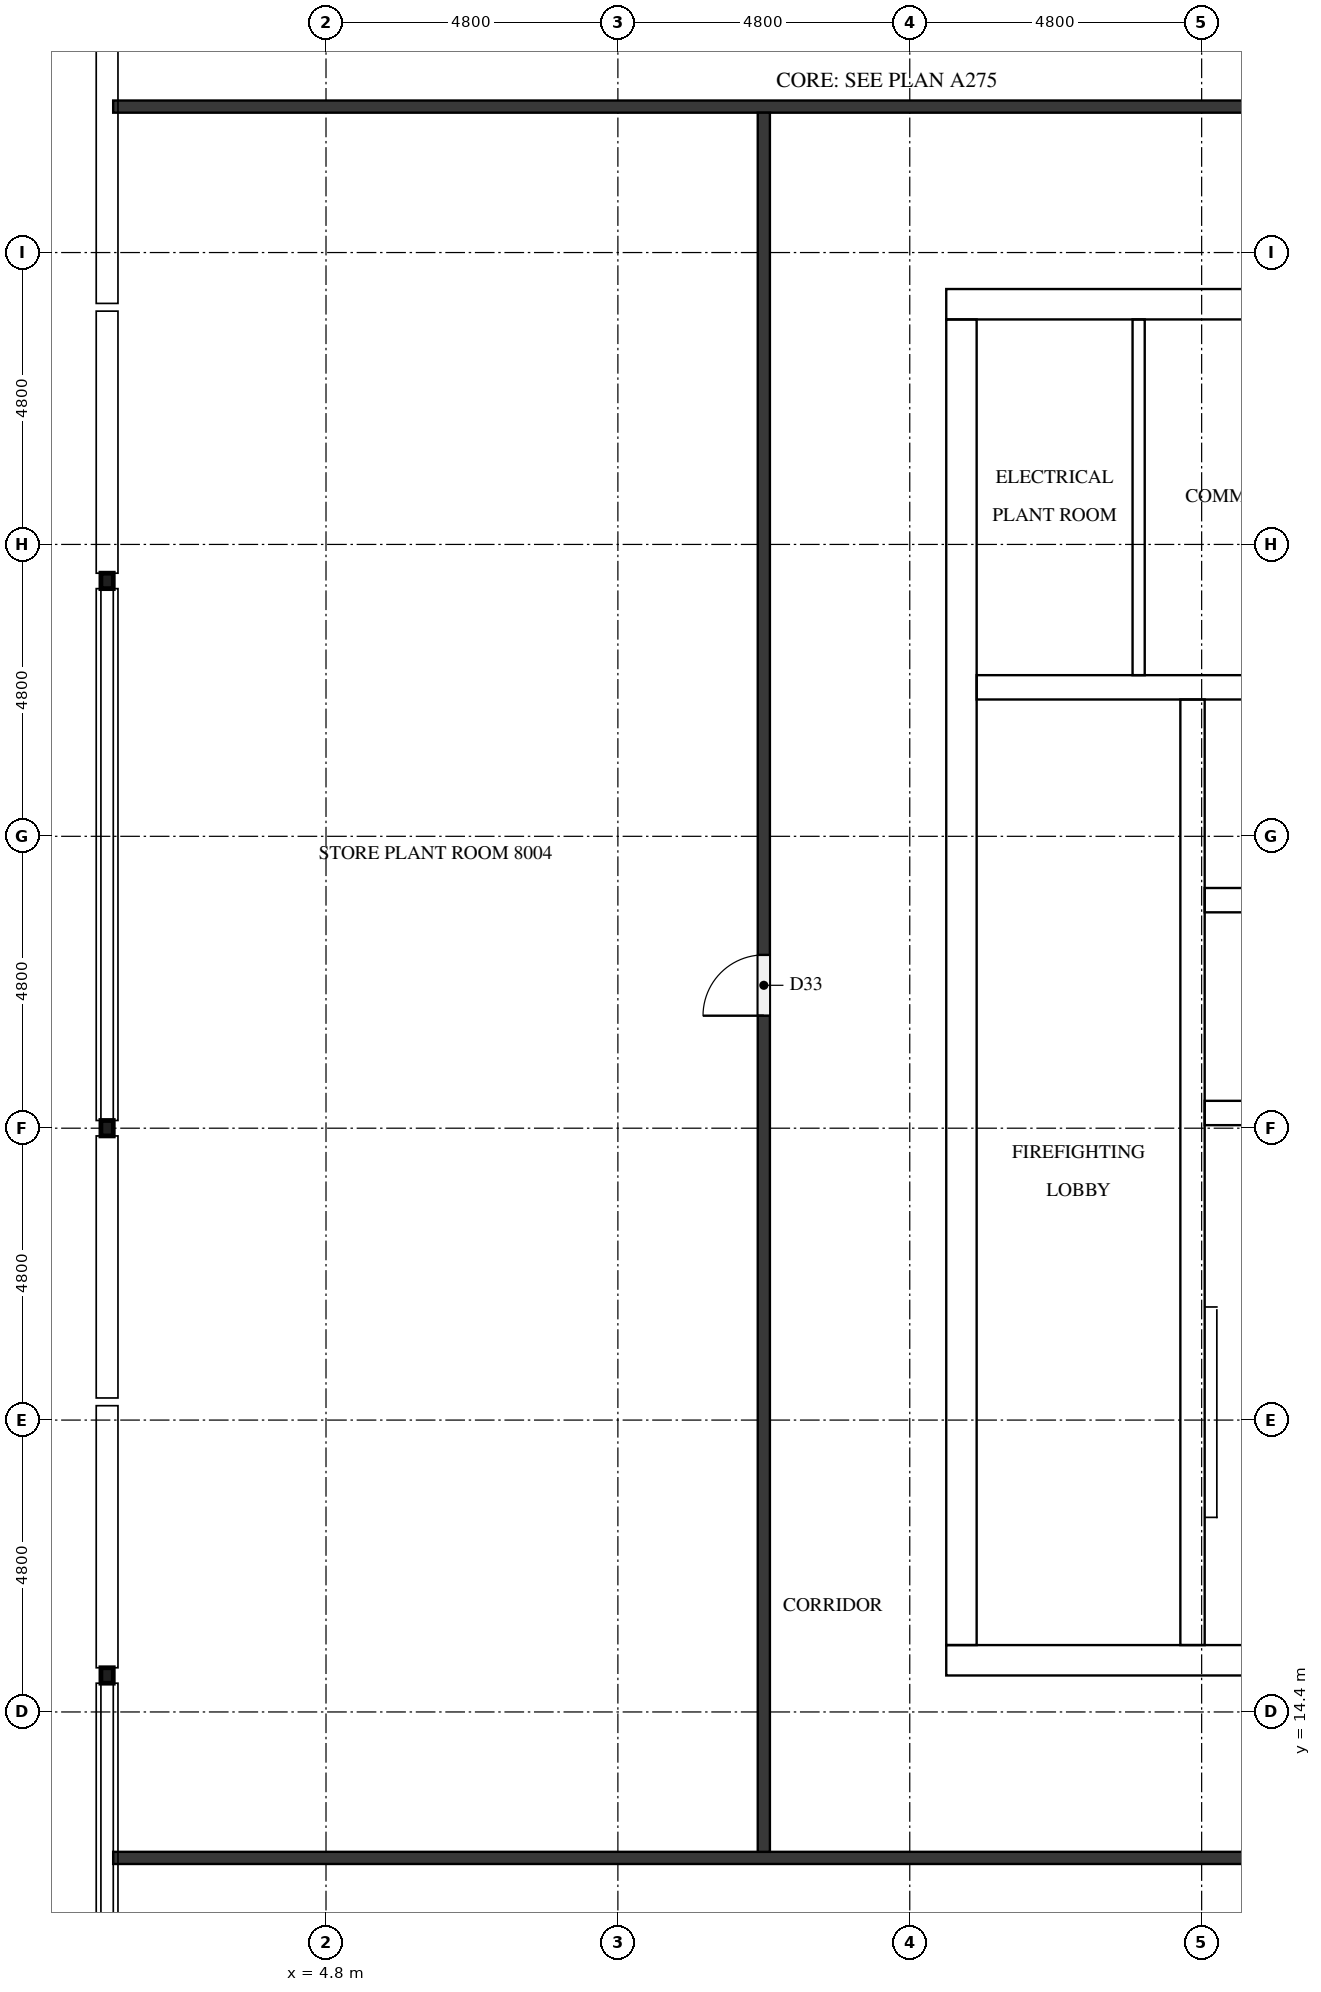
"""IFC4 building model, lengths in metres.
Left out: names, types, materials, properties, quantities, classifications, styles, units other than length and angle.
Written with IfcOpenShell. Run it as: python <this file> out.ifc"""

import sys

from ifc_helpers import new_model, si_unit, direction, frame, frame_2d, origin, origin_2d, place, context, subcontext, project, spatial, rectangle, hollow_rectangle, extrude, element, fill, save


model = new_model("IFC4")
c1 = context("Model", 3, precision=1e-05, world=origin(), true_north=direction((0.0, 1.0)))
c2 = subcontext(c1, "Body", "Model", "MODEL_VIEW")
j1 = project(units=[si_unit("LENGTHUNIT", "METRE"), si_unit("PLANEANGLEUNIT", "RADIAN")], contexts=[c1])
p1 = place(None, origin())
s1 = spatial("IfcSite", under=j1, at=p1, CompositionType="ELEMENT")
p2 = place(p1, origin())
s2 = spatial("IfcBuilding", under=s1, at=p2, CompositionType="ELEMENT")
p3 = place(p2, frame((0.0, 0.0, 310.1)))
s3 = spatial("IfcBuildingStorey", under=s2, at=p3, CompositionType="ELEMENT", Elevation=310.1)
p4 = place(p3, frame((15.0, 15.25, 0.0), z_axis=(0.0, 0.0, 1.0), x_axis=(1.0, 0.0, 0.0)))
e1 = element("IfcWall", 1, at=p4, inside=s3, PredefinedType="SHEAR", context=c2, shape_type="SweptSolid", body=[
    extrude(rectangle(XDim=32.4, YDim=0.5, at=frame_2d((16.2, 0.0))), origin(), (0.0, 0.0, 1.0), 3.8),
])
p5 = place(p4, frame((15.3, 0.0, 0.0)))
e2 = element("IfcOpeningElement", 2, at=p5, cuts=e1, PredefinedType="OPENING", context=c2, shape_type="SweptSolid", body=[
    extrude(rectangle(XDim=1.8, YDim=2.1, at=frame_2d((0.9, 1.05))), frame((0.0, 0.26, 0.0), z_axis=(0.0, -1.0, 0.0), x_axis=(1.0, 0.0, 0.0)), (0.0, 0.0, 1.0), 0.52),
])
p6 = place(p3, frame((15.0, 37.55, 0.0), z_axis=(0.0, 0.0, 1.0), x_axis=(1.0, 0.0, 0.0)))
e3 = element("IfcWall", 3, at=p6, inside=s3, PredefinedType="SHEAR", context=c2, shape_type="SweptSolid", body=[
    extrude(rectangle(XDim=32.4, YDim=0.5, at=frame_2d((16.2, 0.0))), origin(), (0.0, 0.0, 1.0), 3.8),
])
p7 = place(p6, frame((15.3, 0.0, 0.0)))
e4 = element("IfcOpeningElement", 4, at=p7, cuts=e3, PredefinedType="OPENING", context=c2, shape_type="SweptSolid", body=[
    extrude(rectangle(XDim=1.8, YDim=2.1, at=frame_2d((0.9, 1.05))), frame((0.0, 0.26, 0.0), z_axis=(0.0, -1.0, 0.0), x_axis=(1.0, 0.0, 0.0)), (0.0, 0.0, 1.0), 0.52),
])
p8 = place(p6, frame((1.282, 0.0, 0.0)))
e5 = element("IfcOpeningElement", 5, at=p8, cuts=e3, PredefinedType="OPENING", context=c2, shape_type="SweptSolid", body=[
    extrude(rectangle(XDim=1.0, YDim=2.1, at=frame_2d((0.5, 1.05))), frame((0.0, 0.26, 0.0), z_axis=(0.0, -1.0, 0.0), x_axis=(1.0, 0.0, 0.0)), (0.0, 0.0, 1.0), 0.52),
])
p9 = place(p6, frame((5.082, 0.0, 0.0)))
e6 = element("IfcOpeningElement", 6, at=p9, cuts=e3, PredefinedType="OPENING", context=c2, shape_type="SweptSolid", body=[
    extrude(rectangle(XDim=1.0, YDim=2.1, at=frame_2d((0.5, 1.05))), frame((0.0, 0.26, 0.0), z_axis=(0.0, -1.0, 0.0), x_axis=(1.0, 0.0, 0.0)), (0.0, 0.0, 1.0), 0.52),
])
p10 = place(p3, frame((15.25, 15.5, 0.0), z_axis=(0.0, 0.0, 1.0), x_axis=(0.0, 1.0, 0.0)))
e7 = element("IfcWall", 7, at=p10, inside=s3, PredefinedType="SHEAR", context=c2, shape_type="SweptSolid", body=[
    extrude(rectangle(XDim=21.8, YDim=0.5, at=frame_2d((10.9, 0.0))), origin(), (0.0, 0.0, 1.0), 3.8),
])
p11 = place(p10, frame((5.26, 0.0, 0.0)))
e8 = element("IfcOpeningElement", 8, at=p11, cuts=e7, PredefinedType="OPENING", context=c2, shape_type="SweptSolid", body=[
    extrude(rectangle(XDim=1.2, YDim=2.1, at=frame_2d((0.6, 1.05))), frame((0.0, 0.26, 0.0), z_axis=(0.0, -1.0, 0.0), x_axis=(1.0, 0.0, 0.0)), (0.0, 0.0, 1.0), 0.52),
])
p12 = place(p3, frame((19.05, 15.5, 0.0), z_axis=(0.0, 0.0, 1.0), x_axis=(0.0, 1.0, 0.0)))
e9 = element("IfcWall", 9, at=p12, inside=s3, PredefinedType="SHEAR", context=c2, shape_type="SweptSolid", body=[
    extrude(rectangle(XDim=15.55, YDim=0.4, at=frame_2d((7.775, 0.0))), origin(), (0.0, 0.0, 1.0), 3.8),
])
p13 = place(p12, frame((9.95, 0.0, 0.0)))
e10 = element("IfcOpeningElement", 10, at=p13, cuts=e9, PredefinedType="OPENING", context=c2, shape_type="SweptSolid", body=[
    extrude(rectangle(XDim=1.1, YDim=2.1, at=frame_2d((0.55, 1.05))), frame((0.0, 0.21, 0.0), z_axis=(0.0, -1.0, 0.0), x_axis=(1.0, 0.0, 0.0)), (0.0, 0.0, 1.0), 0.42),
])
p14 = place(p12, frame((13.45, 0.0, 0.0)))
e11 = element("IfcOpeningElement", 11, at=p14, cuts=e9, PredefinedType="OPENING", context=c2, shape_type="SweptSolid", body=[
    extrude(rectangle(XDim=1.1, YDim=2.1, at=frame_2d((0.55, 1.05))), frame((0.0, 0.21, 0.0), z_axis=(0.0, -1.0, 0.0), x_axis=(1.0, 0.0, 0.0)), (0.0, 0.0, 1.0), 0.42),
])
p15 = place(p12, frame((0.7, 0.0, 0.0)))
e12 = element("IfcOpeningElement", 12, at=p15, cuts=e9, PredefinedType="OPENING", context=c2, shape_type="SweptSolid", body=[
    extrude(rectangle(XDim=1.2, YDim=2.1, at=frame_2d((0.6, 1.05))), frame((0.0, 0.21, 0.0), z_axis=(0.0, -1.0, 0.0), x_axis=(1.0, 0.0, 0.0)), (0.0, 0.0, 1.0), 0.42),
])
for number, where, z_axis, x_axis in (
    (13, (19.25, 24.25, 0.0), (0.0, 0.0, 1.0), (1.0, 0.0, 0.0)),
    (14, (19.25, 27.75, 0.0), (0.0, 0.0, 1.0), (1.0, 0.0, 0.0)),
):
    element("IfcWall", number, at=place(p3, frame(where, z_axis=z_axis, x_axis=x_axis)), inside=s3, PredefinedType="SHEAR", context=c2, shape_type="SweptSolid", body=[
        extrude(rectangle(XDim=3.65, YDim=0.4, at=frame_2d((1.825, 0.0))), origin(), (0.0, 0.0, 1.0), 3.8),
    ])
p16 = place(p3, frame((15.5, 31.25, 0.0), z_axis=(0.0, 0.0, 1.0), x_axis=(1.0, 0.0, 0.0)))
e15 = element("IfcWall", 15, at=p16, inside=s3, PredefinedType="SHEAR", context=c2, shape_type="SweptSolid", body=[
    extrude(rectangle(XDim=7.4, YDim=0.4, at=frame_2d((3.7, 0.0))), origin(), (0.0, 0.0, 1.0), 3.8),
])
for number, where, z_axis, x_axis in (
    (16, (1.2, 33.0, 0.0), (0.0, 0.0, 1.0), (1.0, 0.0, 0.0)),
    (17, (1.2, 24.0, 0.0), (0.0, 0.0, 1.0), (1.0, 0.0, 0.0)),
    (18, (1.2, 15.0, 0.0), (0.0, 0.0, 1.0), (1.0, 0.0, 0.0)),
):
    element("IfcColumn", number, at=place(p3, frame(where, z_axis=z_axis, x_axis=x_axis)), inside=s3, PredefinedType="COLUMN", context=c2, shape_type="SweptSolid", body=[
        extrude(hollow_rectangle(XDim=0.203, YDim=0.254, WallThickness=0.01, InnerFilletRadius=0.004, OuterFilletRadius=0.013, at=origin_2d()), origin(), (0.0, 0.0, 1.0), 3.8),
    ])
p17 = place(p3, frame((18.164, 31.45, 0.0), z_axis=(0.0, 0.0, 1.0), x_axis=(0.0, 1.0, 0.0)))
e19 = element("IfcWall", 19, at=p17, inside=s3, PredefinedType="PARTITIONING", context=c2, shape_type="SweptSolid", body=[
    extrude(rectangle(XDim=5.85, YDim=0.2, at=frame_2d((2.925, 0.0))), origin(), (0.0, 0.0, 1.0), 3.8),
])
p18 = place(p3, frame((56.3, 12.0, 0.0), z_axis=(0.0, 0.0, 1.0), x_axis=(-1.0, 0.0, 0.0)))
e20 = element("IfcWall", 20, at=p18, inside=s3, PredefinedType="PARTITIONING", context=c2, shape_type="SweptSolid", body=[
    extrude(rectangle(XDim=55.0, YDim=0.2, at=frame_2d((27.5, 0.0))), origin(), (0.0, 0.0, 1.0), 3.8),
])
p19 = place(p18, frame((35.35, 0.0, 0.0)))
e21 = element("IfcOpeningElement", 21, at=p19, cuts=e20, PredefinedType="OPENING", context=c2, shape_type="SweptSolid", body=[
    extrude(rectangle(XDim=1.0, YDim=2.1, at=frame_2d((0.5, 1.05))), frame((0.0, 0.11, 0.0), z_axis=(0.0, -1.0, 0.0), x_axis=(1.0, 0.0, 0.0)), (0.0, 0.0, 1.0), 0.22),
])
p20 = place(p18, frame((16.15, 0.0, 0.0)))
e22 = element("IfcOpeningElement", 22, at=p20, cuts=e20, PredefinedType="OPENING", context=c2, shape_type="SweptSolid", body=[
    extrude(rectangle(XDim=1.0, YDim=2.1, at=frame_2d((0.5, 1.05))), frame((0.0, 0.11, 0.0), z_axis=(0.0, -1.0, 0.0), x_axis=(1.0, 0.0, 0.0)), (0.0, 0.0, 1.0), 0.22),
])
p21 = place(p3, frame((1.3, 40.8, 0.0), z_axis=(0.0, 0.0, 1.0), x_axis=(1.0, 0.0, 0.0)))
e23 = element("IfcWall", 23, at=p21, inside=s3, PredefinedType="PARTITIONING", context=c2, shape_type="SweptSolid", body=[
    extrude(rectangle(XDim=55.0, YDim=0.2, at=frame_2d((27.5, 0.0))), origin(), (0.0, 0.0, 1.0), 3.8),
])
p22 = place(p21, frame((29.35, 0.0, 0.0)))
e24 = element("IfcOpeningElement", 24, at=p22, cuts=e23, PredefinedType="OPENING", context=c2, shape_type="SweptSolid", body=[
    extrude(rectangle(XDim=1.0, YDim=2.1, at=frame_2d((0.5, 1.05))), frame((0.0, 0.11, 0.0), z_axis=(0.0, -1.0, 0.0), x_axis=(1.0, 0.0, 0.0)), (0.0, 0.0, 1.0), 0.22),
])
p23 = place(p3, frame((12.0, 12.1, 0.0), z_axis=(0.0, 0.0, 1.0), x_axis=(0.0, 1.0, 0.0)))
e25 = element("IfcWall", 25, at=p23, inside=s3, PredefinedType="PARTITIONING", context=c2, shape_type="SweptSolid", body=[
    extrude(rectangle(XDim=28.6, YDim=0.2, at=frame_2d((14.3, 0.0))), origin(), (0.0, 0.0, 1.0), 3.8),
])
p24 = place(p23, frame((13.75, 0.0, 0.0)))
e26 = element("IfcOpeningElement", 26, at=p24, cuts=e25, PredefinedType="OPENING", context=c2, shape_type="SweptSolid", body=[
    extrude(rectangle(XDim=1.0, YDim=2.1, at=frame_2d((0.5, 1.05))), frame((0.0, 0.11, 0.0), z_axis=(0.0, -1.0, 0.0), x_axis=(1.0, 0.0, 0.0)), (0.0, 0.0, 1.0), 0.22),
])
p25 = place(p13, origin())
e27 = element("IfcDoor", 27, at=p25, inside=s3, OperationType="DOUBLE_DOOR_SLIDING", PredefinedType="DOOR", context=c2, shape_type="SweptSolid", body=[
    extrude(rectangle(XDim=1.1, YDim=2.1, at=frame_2d((0.55, 1.05))), frame((0.0, 0.025, 0.0), z_axis=(0.0, -1.0, 0.0), x_axis=(1.0, 0.0, 0.0)), (0.0, 0.0, 1.0), 0.05),
])
fill(e10, e27)
p26 = place(p14, origin())
e28 = element("IfcDoor", 28, at=p26, inside=s3, OperationType="DOUBLE_DOOR_SLIDING", PredefinedType="DOOR", context=c2, shape_type="SweptSolid", body=[
    extrude(rectangle(XDim=1.1, YDim=2.1, at=frame_2d((0.55, 1.05))), frame((0.0, 0.025, 0.0), z_axis=(0.0, -1.0, 0.0), x_axis=(1.0, 0.0, 0.0)), (0.0, 0.0, 1.0), 0.05),
])
fill(e11, e28)
p27 = place(p15, frame((1.2, 0.0, 0.0), z_axis=(0.0, 0.0, 1.0), x_axis=(-1.0, 0.0, 0.0)))
e29 = element("IfcDoor", 29, at=p27, inside=s3, OperationType="SINGLE_SWING_RIGHT", PredefinedType="DOOR", context=c2, shape_type="SweptSolid", body=[
    extrude(rectangle(XDim=1.2, YDim=2.1, at=frame_2d((0.6, 1.05))), frame((0.0, 0.025, 0.0), z_axis=(0.0, -1.0, 0.0), x_axis=(1.0, 0.0, 0.0)), (0.0, 0.0, 1.0), 0.05),
])
fill(e12, e29)
p28 = place(p11, frame((1.2, 0.0, 0.0), z_axis=(0.0, 0.0, 1.0), x_axis=(-1.0, 0.0, 0.0)))
e30 = element("IfcDoor", 30, at=p28, inside=s3, OperationType="SINGLE_SWING_LEFT", PredefinedType="DOOR", context=c2, shape_type="SweptSolid", body=[
    extrude(rectangle(XDim=1.2, YDim=2.1, at=frame_2d((0.6, 1.05))), frame((0.0, 0.025, 0.0), z_axis=(0.0, -1.0, 0.0), x_axis=(1.0, 0.0, 0.0)), (0.0, 0.0, 1.0), 0.05),
])
fill(e8, e30)
p29 = place(p8, origin())
e31 = element("IfcDoor", 31, at=p29, inside=s3, OperationType="SINGLE_SWING_LEFT", PredefinedType="DOOR", context=c2, shape_type="SweptSolid", body=[
    extrude(rectangle(XDim=1.0, YDim=2.1, at=frame_2d((0.5, 1.05))), frame((0.0, 0.025, 0.0), z_axis=(0.0, -1.0, 0.0), x_axis=(1.0, 0.0, 0.0)), (0.0, 0.0, 1.0), 0.05),
])
fill(e5, e31)
p30 = place(p24, origin())
e32 = element("IfcDoor", 32, at=p30, inside=s3, OperationType="SINGLE_SWING_LEFT", PredefinedType="DOOR", context=c2, shape_type="SweptSolid", body=[
    extrude(rectangle(XDim=1.0, YDim=2.1, at=frame_2d((0.5, 1.05))), frame((0.0, 0.025, 0.0), z_axis=(0.0, -1.0, 0.0), x_axis=(1.0, 0.0, 0.0)), (0.0, 0.0, 1.0), 0.05),
])
fill(e26, e32)
save(model, sys.argv[1])
